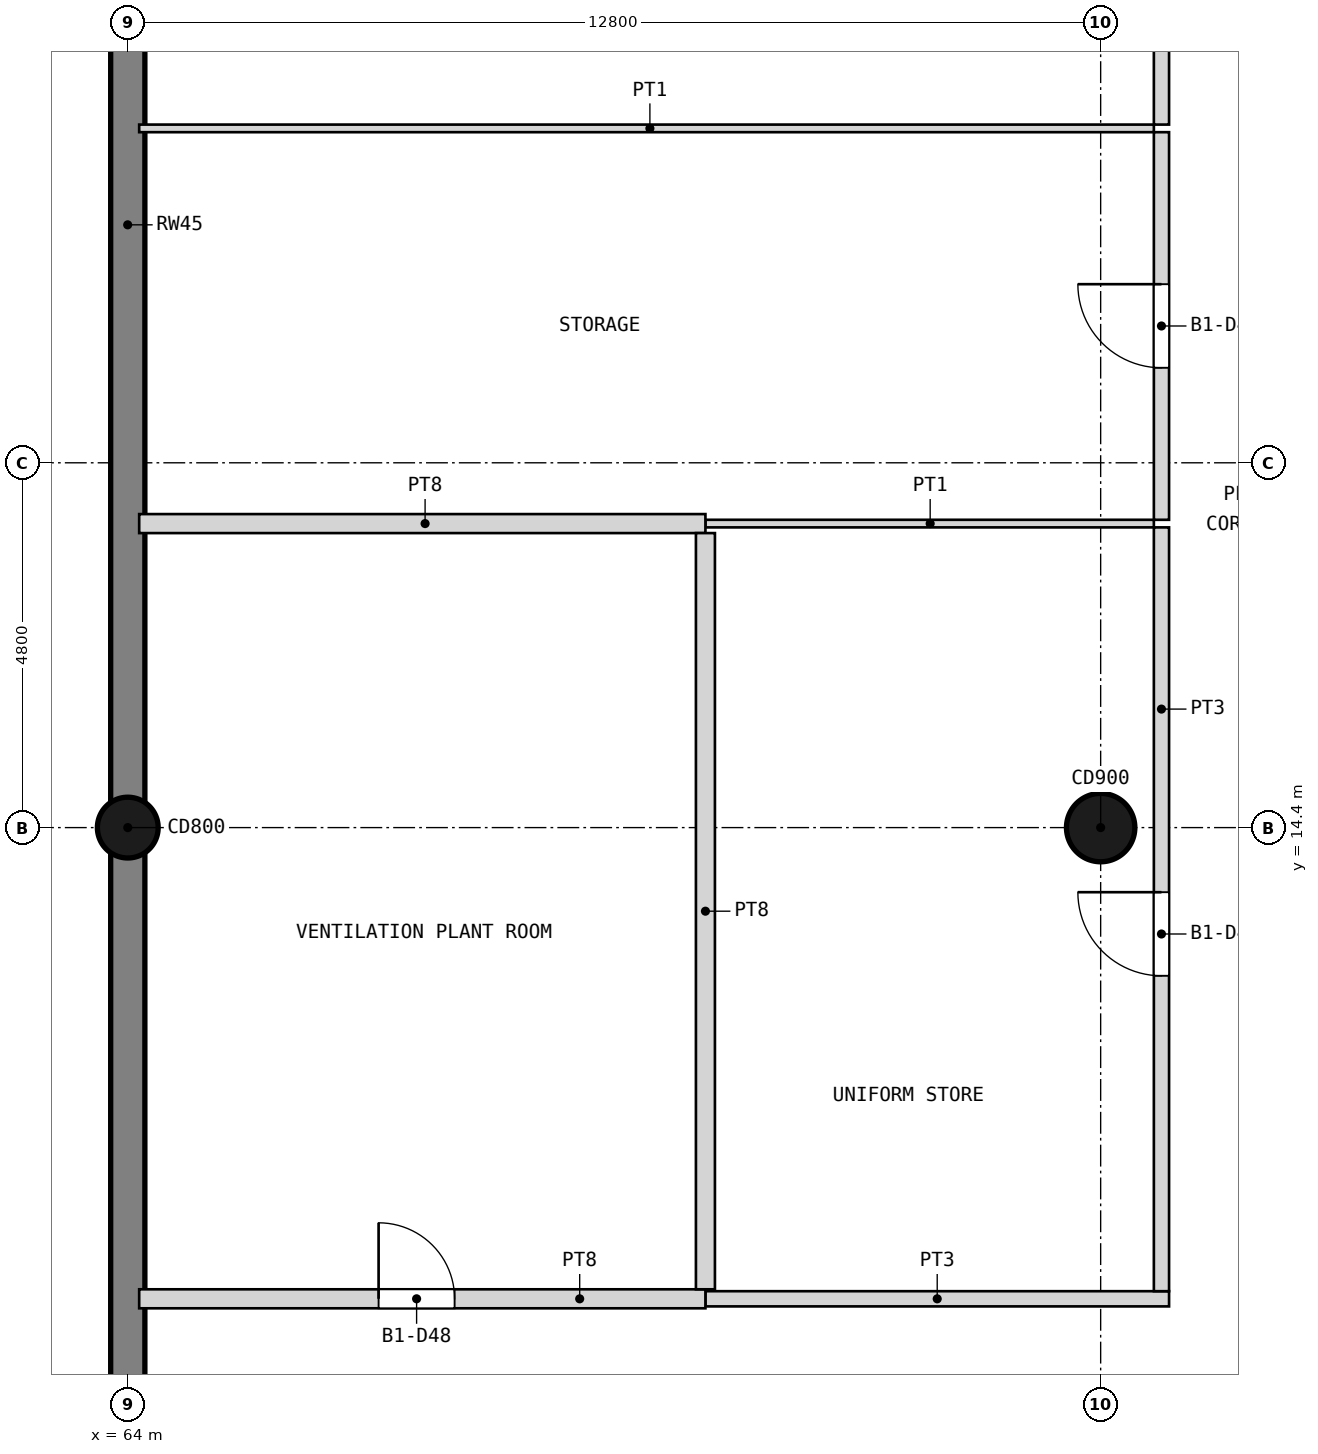
"""IFC4 building model, lengths in metres.
Left out: names, types, materials, properties, quantities, classifications, styles, units other than length and angle.
Written with IfcOpenShell. Run it as: python <this file> out.ifc"""

import sys

from ifc_helpers import new_model, si_unit, direction, frame, frame_2d, origin, origin_2d, place, context, subcontext, project, spatial, rectangle, circle, extrude, element, fill, save


model = new_model("IFC4")
c1 = context("Model", 3, precision=1e-05, world=origin(), true_north=direction((0.0, 1.0)))
c2 = subcontext(c1, "Body", "Model", "MODEL_VIEW")
j1 = project(units=[si_unit("LENGTHUNIT", "METRE"), si_unit("PLANEANGLEUNIT", "RADIAN")], contexts=[c1])
p1 = place(None, origin())
s1 = spatial("IfcSite", under=j1, at=p1, CompositionType="ELEMENT")
p2 = place(p1, origin())
s2 = spatial("IfcBuilding", under=s1, at=p2, CompositionType="ELEMENT")
p3 = place(p2, frame((0.0, 0.0, -4.8)))
s3 = spatial("IfcBuildingStorey", under=s2, at=p3, CompositionType="ELEMENT", Elevation=-4.8)
p4 = place(p3, frame((64.0, -0.225, 0.0), z_axis=(0.0, 0.0, 1.0), x_axis=(0.0, 1.0, 0.0)))
e1 = element("IfcWall", 1, at=p4, inside=s3, PredefinedType="SOLIDWALL", context=c2, shape_type="SweptSolid", body=[
    extrude(rectangle(XDim=33.6, YDim=0.45, at=frame_2d((16.8, 0.0))), origin(), (0.0, 0.0, 1.0), 4.8),
])
p5 = place(p3, frame((76.8, 14.4, 0.0), z_axis=(0.0, 0.0, 1.0), x_axis=(1.0, 0.0, 0.0)))
e2 = element("IfcColumn", 2, at=p5, inside=s3, PredefinedType="COLUMN", context=c2, shape_type="SweptSolid", body=[
    extrude(circle(Radius=0.45, at=origin_2d()), origin(), (0.0, 0.0, 1.0), 4.8),
])
p6 = place(p3, frame((64.0, 14.4, 0.0), z_axis=(0.0, 0.0, 1.0), x_axis=(1.0, 0.0, 0.0)))
e3 = element("IfcColumn", 3, at=p6, inside=s3, PredefinedType="COLUMN", context=c2, shape_type="SweptSolid", body=[
    extrude(circle(Radius=0.4, at=origin_2d()), origin(), (0.0, 0.0, 1.0), 4.8),
])
p7 = place(p3, frame((77.7, 8.2, 0.0), z_axis=(0.0, 0.0, 1.0), x_axis=(-1.0, 0.0, 0.0)))
e4 = element("IfcWall", 4, at=p7, inside=s3, PredefinedType="PARTITIONING", context=c2, shape_type="SweptSolid", body=[
    extrude(rectangle(XDim=6.1, YDim=0.2, at=frame_2d((3.05, 0.0))), origin(), (0.0, 0.0, 1.0), 4.5),
])
p8 = place(p3, frame((71.6, 8.2, 0.0), z_axis=(0.0, 0.0, 1.0), x_axis=(-1.0, 0.0, 0.0)))
e5 = element("IfcWall", 5, at=p8, inside=s3, PredefinedType="PARTITIONING", context=c2, shape_type="SweptSolid", body=[
    extrude(rectangle(XDim=7.45, YDim=0.25, at=frame_2d((3.725, 0.0))), origin(), (0.0, 0.0, 1.0), 4.5),
])
p9 = place(p8, frame((3.3, 0.0, 0.0)))
e6 = element("IfcOpeningElement", 6, at=p9, cuts=e5, PredefinedType="OPENING", context=c2, shape_type="SweptSolid", body=[
    extrude(rectangle(XDim=1.0, YDim=2.1, at=frame_2d((0.5, 1.05))), frame((0.0, 0.135, 0.0), z_axis=(0.0, -1.0, 0.0), x_axis=(1.0, 0.0, 0.0)), (0.0, 0.0, 1.0), 0.27),
])
p10 = place(p3, frame((77.5, 18.4, 0.0), z_axis=(0.0, 0.0, 1.0), x_axis=(-1.0, 0.0, 0.0)))
e7 = element("IfcWall", 7, at=p10, inside=s3, PredefinedType="PARTITIONING", context=c2, shape_type="SweptSolid", body=[
    extrude(rectangle(XDim=5.9, YDim=0.1, at=frame_2d((2.95, 0.0))), origin(), (0.0, 0.0, 1.0), 4.5),
])
p11 = place(p3, frame((71.6, 18.4, 0.0), z_axis=(0.0, 0.0, 1.0), x_axis=(-1.0, 0.0, 0.0)))
e8 = element("IfcWall", 8, at=p11, inside=s3, PredefinedType="PARTITIONING", context=c2, shape_type="SweptSolid", body=[
    extrude(rectangle(XDim=7.45, YDim=0.25, at=frame_2d((3.725, 0.0))), origin(), (0.0, 0.0, 1.0), 4.5),
])
p12 = place(p3, frame((77.5, 23.6, 0.0), z_axis=(0.0, 0.0, 1.0), x_axis=(-1.0, 0.0, 0.0)))
e9 = element("IfcWall", 9, at=p12, inside=s3, PredefinedType="PARTITIONING", context=c2, shape_type="SweptSolid", body=[
    extrude(rectangle(XDim=13.35, YDim=0.1, at=frame_2d((6.675, 0.0))), origin(), (0.0, 0.0, 1.0), 4.5),
])
p13 = place(p3, frame((77.6, 8.3, 0.0), z_axis=(0.0, 0.0, 1.0), x_axis=(0.0, 1.0, 0.0)))
e10 = element("IfcWall", 10, at=p13, inside=s3, PredefinedType="PARTITIONING", context=c2, shape_type="SweptSolid", body=[
    extrude(rectangle(XDim=10.05, YDim=0.2, at=frame_2d((5.025, 0.0))), origin(), (0.0, 0.0, 1.0), 4.5),
])
p14 = place(p13, frame((4.15, 0.0, 0.0)))
e11 = element("IfcOpeningElement", 11, at=p14, cuts=e10, PredefinedType="OPENING", context=c2, shape_type="SweptSolid", body=[
    extrude(rectangle(XDim=1.1, YDim=2.1, at=frame_2d((0.55, 1.05))), frame((0.0, 0.11, 0.0), z_axis=(0.0, -1.0, 0.0), x_axis=(1.0, 0.0, 0.0)), (0.0, 0.0, 1.0), 0.22),
])
p15 = place(p3, frame((77.6, 18.45, 0.0), z_axis=(0.0, 0.0, 1.0), x_axis=(0.0, 1.0, 0.0)))
e12 = element("IfcWall", 12, at=p15, inside=s3, PredefinedType="PARTITIONING", context=c2, shape_type="SweptSolid", body=[
    extrude(rectangle(XDim=5.1, YDim=0.2, at=frame_2d((2.55, 0.0))), origin(), (0.0, 0.0, 1.0), 4.5),
])
p16 = place(p15, frame((2.0, 0.0, 0.0)))
e13 = element("IfcOpeningElement", 13, at=p16, cuts=e12, PredefinedType="OPENING", context=c2, shape_type="SweptSolid", body=[
    extrude(rectangle(XDim=1.1, YDim=2.1, at=frame_2d((0.55, 1.05))), frame((0.0, 0.11, 0.0), z_axis=(0.0, -1.0, 0.0), x_axis=(1.0, 0.0, 0.0)), (0.0, 0.0, 1.0), 0.22),
])
p17 = place(p3, frame((77.6, 23.65, 0.0), z_axis=(0.0, 0.0, 1.0), x_axis=(0.0, 1.0, 0.0)))
e14 = element("IfcWall", 14, at=p17, inside=s3, PredefinedType="PARTITIONING", context=c2, shape_type="SweptSolid", body=[
    extrude(rectangle(XDim=5.05, YDim=0.2, at=frame_2d((2.525, 0.0))), origin(), (0.0, 0.0, 1.0), 4.5),
])
p18 = place(p3, frame((71.6, 8.325, 0.0), z_axis=(0.0, 0.0, 1.0), x_axis=(0.0, 1.0, 0.0)))
e15 = element("IfcWall", 15, at=p18, inside=s3, PredefinedType="PARTITIONING", context=c2, shape_type="SweptSolid", body=[
    extrude(rectangle(XDim=9.95, YDim=0.25, at=frame_2d((4.975, 0.0))), origin(), (0.0, 0.0, 1.0), 4.5),
])
p19 = place(p14, origin())
e16 = element("IfcDoor", 16, at=p19, inside=s3, OperationType="SINGLE_SWING_RIGHT", PredefinedType="DOOR", context=c2, shape_type="SweptSolid", body=[
    extrude(rectangle(XDim=1.1, YDim=2.1, at=frame_2d((0.55, 1.05))), frame((0.0, 0.025, 0.0), z_axis=(0.0, -1.0, 0.0), x_axis=(1.0, 0.0, 0.0)), (0.0, 0.0, 1.0), 0.05),
])
fill(e11, e16)
p20 = place(p9, frame((1.0, 0.0, 0.0), z_axis=(0.0, 0.0, 1.0), x_axis=(-1.0, 0.0, 0.0)))
e17 = element("IfcDoor", 17, at=p20, inside=s3, OperationType="SINGLE_SWING_LEFT", PredefinedType="DOOR", context=c2, shape_type="SweptSolid", body=[
    extrude(rectangle(XDim=1.0, YDim=2.1, at=frame_2d((0.5, 1.05))), frame((0.0, 0.025, 0.0), z_axis=(0.0, -1.0, 0.0), x_axis=(1.0, 0.0, 0.0)), (0.0, 0.0, 1.0), 0.05),
])
fill(e6, e17)
p21 = place(p16, origin())
e18 = element("IfcDoor", 18, at=p21, inside=s3, OperationType="SINGLE_SWING_RIGHT", PredefinedType="DOOR", context=c2, shape_type="SweptSolid", body=[
    extrude(rectangle(XDim=1.1, YDim=2.1, at=frame_2d((0.55, 1.05))), frame((0.0, 0.025, 0.0), z_axis=(0.0, -1.0, 0.0), x_axis=(1.0, 0.0, 0.0)), (0.0, 0.0, 1.0), 0.05),
])
fill(e13, e18)
save(model, sys.argv[1])
